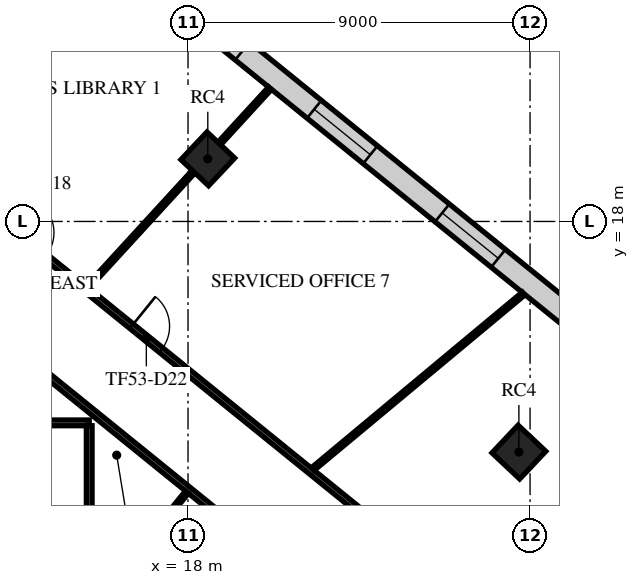
"""IFC4 building model, lengths in metres.
Left out: names, types, materials, properties, quantities, classifications, styles, units other than length and angle.
Written with IfcOpenShell. Run it as: python <this file> out.ifc"""

import sys

from ifc_helpers import new_model, si_unit, direction, frame, frame_2d, origin, origin_2d, place, context, subcontext, project, spatial, rectangle, extrude, element, fill, save


model = new_model("IFC4")
c1 = context("Model", 3, precision=1e-05, world=origin(), true_north=direction((0.0, 1.0)))
c2 = subcontext(c1, "Body", "Model", "MODEL_VIEW")
j1 = project(units=[si_unit("LENGTHUNIT", "METRE"), si_unit("PLANEANGLEUNIT", "RADIAN")], contexts=[c1])
p1 = place(None, origin())
s1 = spatial("IfcSite", under=j1, at=p1, CompositionType="ELEMENT")
p2 = place(p1, origin())
s2 = spatial("IfcBuilding", under=s1, at=p2, CompositionType="ELEMENT")
p3 = place(p2, frame((0.0, 0.0, 225.3)))
s3 = spatial("IfcBuildingStorey", under=s2, at=p3, CompositionType="ELEMENT", Elevation=225.3)
for number, where, z_axis, x_axis in (
    (1, (26.706, 11.931, 0.0), (0.0, 0.0, 1.0), (0.686, 0.728, 0.0)),
    (2, (18.52, 19.647, 0.0), (0.0, 0.0, 1.0), (0.686, 0.728, 0.0)),
):
    element("IfcColumn", number, at=place(p3, frame(where, z_axis=z_axis, x_axis=x_axis)), inside=s3, PredefinedType="COLUMN", context=c2, shape_type="SweptSolid", body=[
        extrude(rectangle(XDim=1.0, YDim=1.0, at=origin_2d()), origin(), (0.0, 0.0, 1.0), 4.0),
    ])
p4 = place(p3, frame((33.845, 10.81, 0.0), z_axis=(0.0, 0.0, 1.0), x_axis=(-0.777145437972, 0.629321037499, 0.0)))
e3 = element("IfcWall", 3, at=p4, inside=s3, PredefinedType="STANDARD", context=c2, shape_type="SweptSolid", body=[
    extrude(rectangle(XDim=39.0, YDim=0.6, at=frame_2d((19.5, 0.0))), origin(), (0.0, 0.0, 1.0), 3.62),
])
p5 = place(p4, frame((1.217, 0.0, 0.9)))
e4 = element("IfcOpeningElement", 4, at=p5, cuts=e3, PredefinedType="OPENING", context=c2, shape_type="SweptSolid", body=[
    extrude(rectangle(XDim=1.9, YDim=2.1, at=frame_2d((0.95, 1.05))), frame((0.0, 0.31, 0.0), z_axis=(0.0, -1.0, 0.0), x_axis=(1.0, 0.0, 0.0)), (0.0, 0.0, 1.0), 0.62),
])
p6 = place(p4, frame((5.55, 0.0, 0.9)))
e5 = element("IfcOpeningElement", 5, at=p6, cuts=e3, PredefinedType="OPENING", context=c2, shape_type="SweptSolid", body=[
    extrude(rectangle(XDim=1.9, YDim=2.1, at=frame_2d((0.95, 1.05))), frame((0.0, 0.31, 0.0), z_axis=(0.0, -1.0, 0.0), x_axis=(1.0, 0.0, 0.0)), (0.0, 0.0, 1.0), 0.62),
])
p7 = place(p4, frame((9.883, 0.0, 0.9)))
e6 = element("IfcOpeningElement", 6, at=p7, cuts=e3, PredefinedType="OPENING", context=c2, shape_type="SweptSolid", body=[
    extrude(rectangle(XDim=1.9, YDim=2.1, at=frame_2d((0.95, 1.05))), frame((0.0, 0.31, 0.0), z_axis=(0.0, -1.0, 0.0), x_axis=(1.0, 0.0, 0.0)), (0.0, 0.0, 1.0), 0.62),
])
p8 = place(p4, frame((14.217, 0.0, 0.9)))
e7 = element("IfcOpeningElement", 7, at=p8, cuts=e3, PredefinedType="OPENING", context=c2, shape_type="SweptSolid", body=[
    extrude(rectangle(XDim=1.9, YDim=2.1, at=frame_2d((0.95, 1.05))), frame((0.0, 0.31, 0.0), z_axis=(0.0, -1.0, 0.0), x_axis=(1.0, 0.0, 0.0)), (0.0, 0.0, 1.0), 0.62),
])
p9 = place(p4, frame((18.55, 0.0, 0.9)))
e8 = element("IfcOpeningElement", 8, at=p9, cuts=e3, PredefinedType="OPENING", context=c2, shape_type="SweptSolid", body=[
    extrude(rectangle(XDim=1.9, YDim=2.1, at=frame_2d((0.95, 1.05))), frame((0.0, 0.31, 0.0), z_axis=(0.0, -1.0, 0.0), x_axis=(1.0, 0.0, 0.0)), (0.0, 0.0, 1.0), 0.62),
])
p10 = place(p4, frame((22.883, 0.0, 0.9)))
e9 = element("IfcOpeningElement", 9, at=p10, cuts=e3, PredefinedType="OPENING", context=c2, shape_type="SweptSolid", body=[
    extrude(rectangle(XDim=1.9, YDim=2.1, at=frame_2d((0.95, 1.05))), frame((0.0, 0.31, 0.0), z_axis=(0.0, -1.0, 0.0), x_axis=(1.0, 0.0, 0.0)), (0.0, 0.0, 1.0), 0.62),
])
p11 = place(p4, frame((27.217, 0.0, 0.9)))
e10 = element("IfcOpeningElement", 10, at=p11, cuts=e3, PredefinedType="OPENING", context=c2, shape_type="SweptSolid", body=[
    extrude(rectangle(XDim=1.9, YDim=2.1, at=frame_2d((0.95, 1.05))), frame((0.0, 0.31, 0.0), z_axis=(0.0, -1.0, 0.0), x_axis=(1.0, 0.0, 0.0)), (0.0, 0.0, 1.0), 0.62),
])
p12 = place(p4, frame((31.55, 0.0, 0.9)))
e11 = element("IfcOpeningElement", 11, at=p12, cuts=e3, PredefinedType="OPENING", context=c2, shape_type="SweptSolid", body=[
    extrude(rectangle(XDim=1.9, YDim=2.1, at=frame_2d((0.95, 1.05))), frame((0.0, 0.31, 0.0), z_axis=(0.0, -1.0, 0.0), x_axis=(1.0, 0.0, 0.0)), (0.0, 0.0, 1.0), 0.62),
])
p13 = place(p4, frame((35.883, 0.0, 0.9)))
e12 = element("IfcOpeningElement", 12, at=p13, cuts=e3, PredefinedType="OPENING", context=c2, shape_type="SweptSolid", body=[
    extrude(rectangle(XDim=1.9, YDim=2.1, at=frame_2d((0.95, 1.05))), frame((0.0, 0.31, 0.0), z_axis=(0.0, -1.0, 0.0), x_axis=(1.0, 0.0, 0.0)), (0.0, 0.0, 1.0), 0.62),
])
p14 = place(p3, frame((3.616, 25.688, 0.0), z_axis=(0.0, 0.0, 1.0), x_axis=(0.777137029952, -0.62933142038, 0.0)))
e13 = element("IfcWall", 13, at=p14, inside=s3, PredefinedType="PARTITIONING", context=c2, shape_type="SweptSolid", body=[
    extrude(rectangle(XDim=26.785, YDim=0.15, at=frame_2d((13.393, 0.0))), origin(), (0.0, 0.0, 1.0), 3.17),
])
p15 = place(p14, frame((12.682, 0.0, 0.0)))
e14 = element("IfcOpeningElement", 14, at=p15, cuts=e13, PredefinedType="OPENING", context=c2, shape_type="SweptSolid", body=[
    extrude(rectangle(XDim=1.0, YDim=2.1, at=frame_2d((0.5, 1.05))), frame((0.0, 0.085, 0.0), z_axis=(0.0, -1.0, 0.0), x_axis=(1.0, 0.0, 0.0)), (0.0, 0.0, 1.0), 0.17),
])
p16 = place(p14, frame((16.597, 0.0, 0.0)))
e15 = element("IfcOpeningElement", 15, at=p16, cuts=e13, PredefinedType="OPENING", context=c2, shape_type="SweptSolid", body=[
    extrude(rectangle(XDim=1.0, YDim=2.1, at=frame_2d((0.5, 1.05))), frame((0.0, 0.085, 0.0), z_axis=(0.0, -1.0, 0.0), x_axis=(1.0, 0.0, 0.0)), (0.0, 0.0, 1.0), 0.17),
])
p17 = place(p3, frame((12.172, 15.671, 0.0), z_axis=(0.0, 0.0, 1.0), x_axis=(0.777123609621, -0.629347992266, 0.0)))
e16 = element("IfcWall", 16, at=p17, inside=s3, PredefinedType="PARTITIONING", context=c2, shape_type="SweptSolid", body=[
    extrude(rectangle(XDim=13.833, YDim=0.15, at=frame_2d((6.917, 0.0))), origin(), (0.0, 0.0, 1.0), 3.17),
])
p18 = place(p17, frame((11.324, 0.0, 0.0)))
e17 = element("IfcOpeningElement", 17, at=p18, cuts=e16, PredefinedType="OPENING", context=c2, shape_type="SweptSolid", body=[
    extrude(rectangle(XDim=1.8, YDim=2.1, at=frame_2d((0.9, 1.05))), frame((0.0, 0.085, 0.0), z_axis=(0.0, -1.0, 0.0), x_axis=(1.0, 0.0, 0.0)), (0.0, 0.0, 1.0), 0.17),
])
p19 = place(p3, frame((12.7, 12.7, 0.0), z_axis=(0.0, 0.0, 1.0), x_axis=(1.0, 0.0, 0.0)))
e18 = element("IfcWall", 18, at=p19, inside=s3, PredefinedType="PARTITIONING", context=c2, shape_type="SweptSolid", body=[
    extrude(rectangle(XDim=2.7, YDim=0.15, at=frame_2d((1.35, 0.0))), origin(), (0.0, 0.0, 1.0), 3.17),
])
p20 = place(p3, frame((15.4, -7.527, 0.0), z_axis=(0.0, 0.0, 1.0), x_axis=(0.0, 1.0, 0.0)))
e19 = element("IfcWall", 19, at=p20, inside=s3, PredefinedType="PARTITIONING", context=c2, shape_type="SweptSolid", body=[
    extrude(rectangle(XDim=20.152, YDim=0.15, at=frame_2d((10.076, 0.0))), origin(), (0.0, 0.0, 1.0), 3.17),
])
p21 = place(p20, frame((11.908, 0.0, 0.0)))
e20 = element("IfcOpeningElement", 20, at=p21, cuts=e19, PredefinedType="OPENING", context=c2, shape_type="SweptSolid", body=[
    extrude(rectangle(XDim=1.0, YDim=2.1, at=frame_2d((0.5, 1.05))), frame((0.0, 0.085, 0.0), z_axis=(0.0, -1.0, 0.0), x_axis=(1.0, 0.0, 0.0)), (0.0, 0.0, 1.0), 0.17),
])
p22 = place(p3, frame((15.363, 16.276, 0.0), z_axis=(0.0, 0.0, 1.0), x_axis=(0.675708525494, 0.737168900982, 0.0)))
e21 = element("IfcWall", 21, at=p22, inside=s3, PredefinedType="PARTITIONING", context=c2, shape_type="SweptSolid", body=[
    extrude(rectangle(XDim=4.119, YDim=0.1, at=frame_2d((2.06, 0.0))), origin(), (0.0, 0.0, 1.0), 3.05),
])
p23 = place(p3, frame((15.514, 7.843, 0.0), z_axis=(0.0, 0.0, 1.0), x_axis=(0.629311514858, 0.777153149172, 0.0)))
e22 = element("IfcWall", 22, at=p23, inside=s3, PredefinedType="PARTITIONING", context=c2, shape_type="SweptSolid", body=[
    extrude(rectangle(XDim=3.906, YDim=0.1, at=frame_2d((1.953, 0.0))), origin(), (0.0, 0.0, 1.0), 3.17),
])
p24 = place(p3, frame((18.822, 20.05, 0.0), z_axis=(0.0, 0.0, 1.0), x_axis=(0.675724628517, 0.737154140201, 0.0)))
e23 = element("IfcWall", 23, at=p24, inside=s3, PredefinedType="PARTITIONING", context=c2, shape_type="SweptSolid", body=[
    extrude(rectangle(XDim=1.975, YDim=0.1, at=frame_2d((0.988, 0.0))), origin(), (0.0, 0.0, 1.0), 3.62),
])
p25 = place(p3, frame((21.286, 11.487, 0.0), z_axis=(0.0, 0.0, 1.0), x_axis=(0.768459840101, 0.639898018556, 0.0)))
e24 = element("IfcWall", 24, at=p25, inside=s3, PredefinedType="PARTITIONING", context=c2, shape_type="SweptSolid", body=[
    extrude(rectangle(XDim=7.212, YDim=0.1, at=frame_2d((3.606, 0.0))), origin(), (0.0, 0.0, 1.0), 2.97),
])
p26 = place(p7, origin())
e25 = element("IfcWindow", 25, at=p26, inside=s3, PartitioningType="SINGLE_PANEL", PredefinedType="WINDOW", context=c2, shape_type="SweptSolid", body=[
    extrude(rectangle(XDim=1.9, YDim=2.1, at=frame_2d((0.95, 1.05))), frame((0.0, 0.03, 0.0), z_axis=(0.0, -1.0, 0.0), x_axis=(1.0, 0.0, 0.0)), (0.0, 0.0, 1.0), 0.06),
])
fill(e6, e25)
p27 = place(p8, origin())
e26 = element("IfcWindow", 26, at=p27, inside=s3, PartitioningType="SINGLE_PANEL", PredefinedType="WINDOW", context=c2, shape_type="SweptSolid", body=[
    extrude(rectangle(XDim=1.9, YDim=2.1, at=frame_2d((0.95, 1.05))), frame((0.0, 0.03, 0.0), z_axis=(0.0, -1.0, 0.0), x_axis=(1.0, 0.0, 0.0)), (0.0, 0.0, 1.0), 0.06),
])
fill(e7, e26)
p28 = place(p16, origin())
e27 = element("IfcDoor", 27, at=p28, inside=s3, OperationType="SINGLE_SWING_RIGHT", PredefinedType="DOOR", context=c2, shape_type="SweptSolid", body=[
    extrude(rectangle(XDim=1.0, YDim=2.1, at=frame_2d((0.5, 1.05))), frame((0.0, 0.025, 0.0), z_axis=(0.0, -1.0, 0.0), x_axis=(1.0, 0.0, 0.0)), (0.0, 0.0, 1.0), 0.05),
])
fill(e15, e27)
save(model, sys.argv[1])
